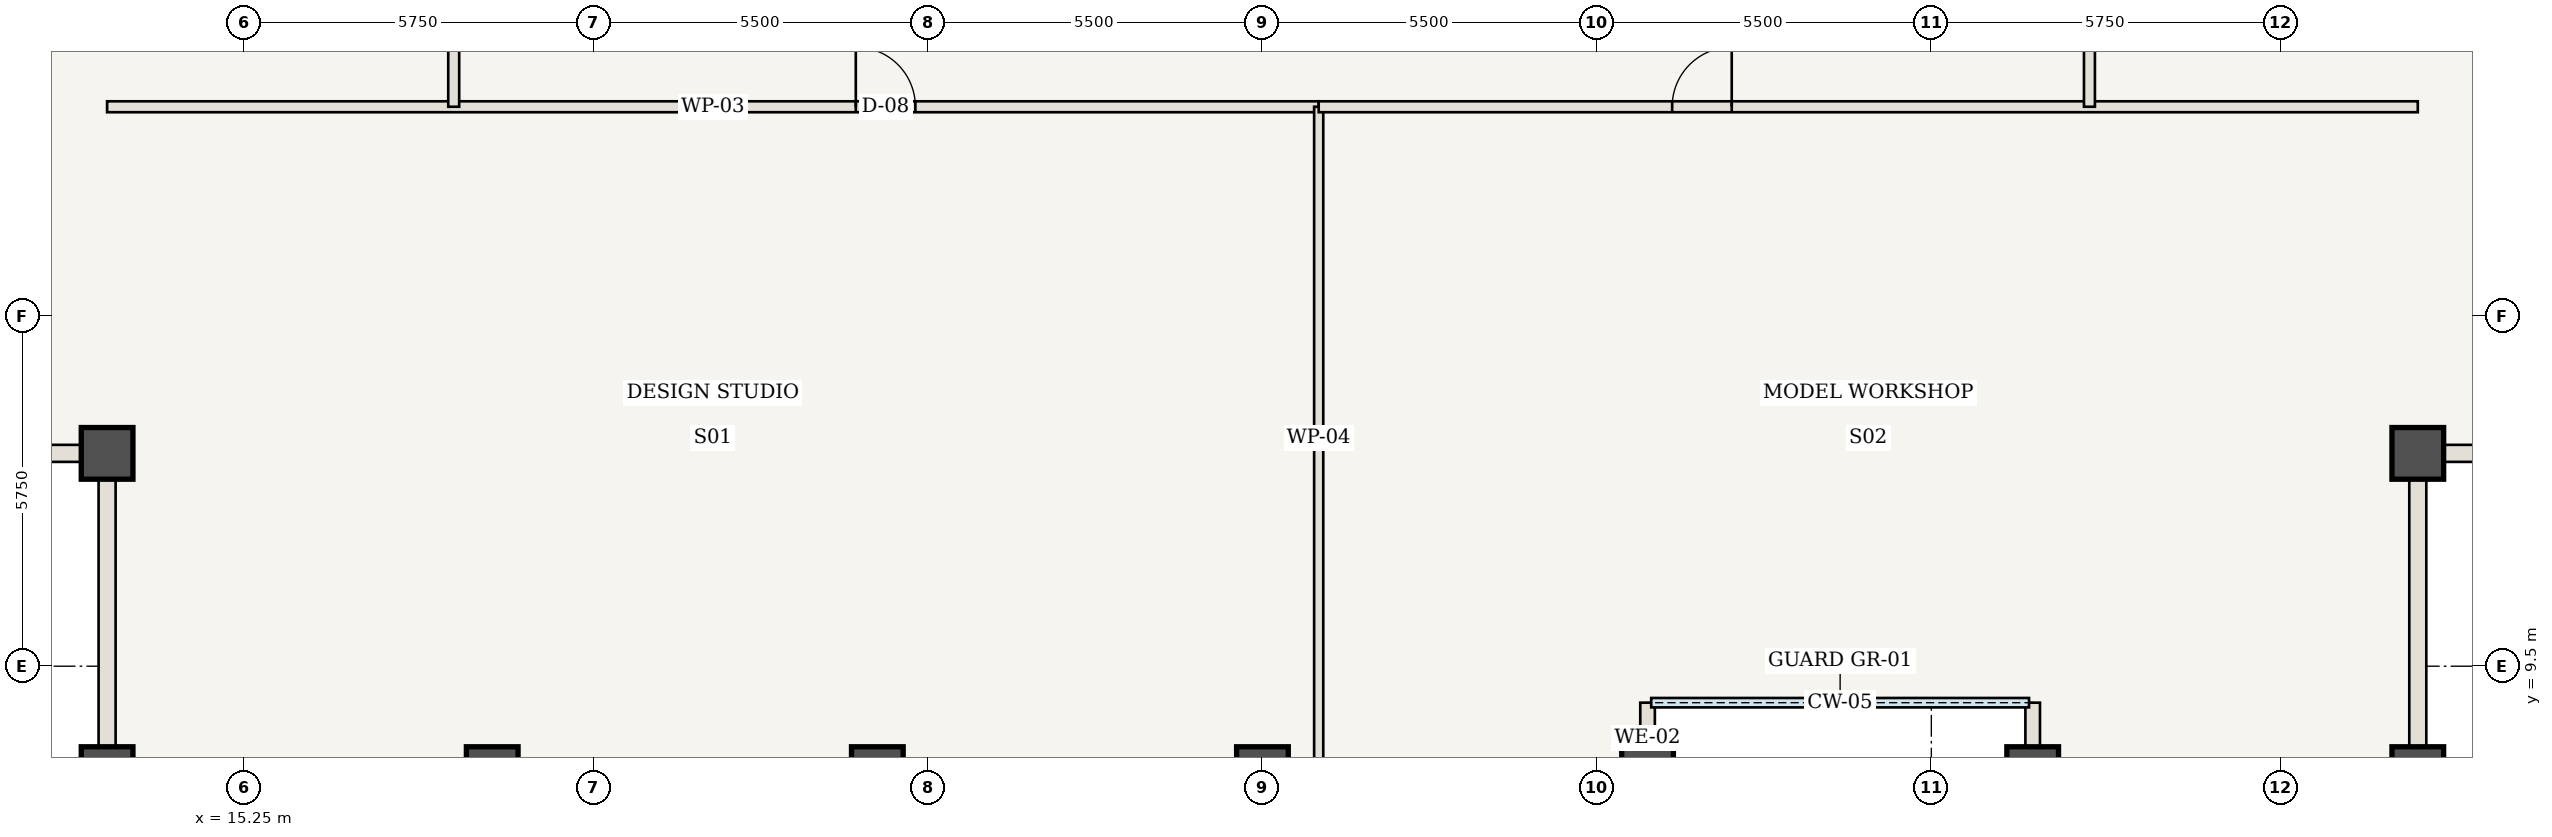
"""IFC4 building model, lengths in metres.
Left out: names, types, materials, properties, quantities, classifications, styles, units other than length and angle.
Written with IfcOpenShell. Run it as: python <this file> out.ifc"""

import sys

from ifc_helpers import new_model, si_unit, direction, frame, frame_2d, origin, origin_2d, place, context, subcontext, project, spatial, rectangle, extrude, element, fill, save


model = new_model("IFC4")
c1 = context("Model", 3, precision=1e-05, world=origin(), true_north=direction((0.0, 1.0)))
c2 = subcontext(c1, "Body", "Model", "MODEL_VIEW")
j1 = project(units=[si_unit("LENGTHUNIT", "METRE"), si_unit("PLANEANGLEUNIT", "RADIAN")], contexts=[c1])
p1 = place(None, origin())
s1 = spatial("IfcSite", under=j1, at=p1, CompositionType="ELEMENT")
p2 = place(p1, origin())
s2 = spatial("IfcBuilding", under=s1, at=p2, CompositionType="ELEMENT")
p3 = place(p2, frame((0.0, 0.0, 213.85)))
s3 = spatial("IfcBuildingStorey", under=s2, at=p3, CompositionType="ELEMENT", Elevation=213.85)
for number, where, z_axis, x_axis in (
    (1, (13.0, 7.75, 0.0), (0.0, 0.0, 1.0), (1.0, 0.0, 0.0)),
    (2, (13.0, 13.0, 0.0), (0.0, 0.0, 1.0), (1.0, 0.0, 0.0)),
    (3, (51.0, 7.75, 0.0), (0.0, 0.0, 1.0), (1.0, 0.0, 0.0)),
    (4, (51.0, 13.0, 0.0), (0.0, 0.0, 1.0), (1.0, 0.0, 0.0)),
    (5, (19.333, 7.75, 0.0), (0.0, 0.0, 1.0), (1.0, 0.0, 0.0)),
    (6, (25.667, 7.75, 0.0), (0.0, 0.0, 1.0), (1.0, 0.0, 0.0)),
    (7, (32.0, 7.75, 0.0), (0.0, 0.0, 1.0), (1.0, 0.0, 0.0)),
    (8, (38.333, 7.75, 0.0), (0.0, 0.0, 1.0), (1.0, 0.0, 0.0)),
    (9, (44.667, 7.75, 0.0), (0.0, 0.0, 1.0), (1.0, 0.0, 0.0)),
):
    element("IfcColumn", number, at=place(p3, frame(where, z_axis=z_axis, x_axis=x_axis)), inside=s3, PredefinedType="COLUMN", context=c2, shape_type="SweptSolid", body=[
        extrude(rectangle(XDim=0.85, YDim=0.85, at=origin_2d()), origin(), (0.0, 0.0, 1.0), 3.85),
    ])
p4 = place(p3, frame((13.0, 18.7, 0.0), z_axis=(0.0, 0.0, 1.0), x_axis=(1.0, 0.0, 0.0)))
e10 = element("IfcWall", 10, at=p4, inside=s3, PredefinedType="STANDARD", context=c2, shape_type="SweptSolid", body=[
    extrude(rectangle(XDim=19.925, YDim=0.18, at=frame_2d((9.962, 0.0))), origin(), (0.0, 0.0, 1.0), 3.685),
])
p5 = place(p4, frame((12.312, 0.0, 0.0)))
e11 = element("IfcOpeningElement", 11, at=p5, cuts=e10, PredefinedType="OPENING", context=c2, shape_type="SweptSolid", body=[
    extrude(rectangle(XDim=0.98, YDim=2.2, at=frame_2d((0.49, 1.1))), frame((0.0, 0.1, 0.0), z_axis=(0.0, -1.0, 0.0), x_axis=(1.0, 0.0, 0.0)), (0.0, 0.0, 1.0), 0.2),
])
p6 = place(p3, frame((32.925, 7.81, 0.0), z_axis=(0.0, 0.0, 1.0), x_axis=(0.0, 1.0, 0.0)))
e12 = element("IfcWall", 12, at=p6, inside=s3, PredefinedType="STANDARD", context=c2, shape_type="SweptSolid", body=[
    extrude(rectangle(XDim=10.89, YDim=0.15, at=frame_2d((5.445, 0.0))), origin(), (0.0, 0.0, 1.0), 3.685),
])
p7 = place(p3, frame((32.925, 18.7, 0.0), z_axis=(0.0, 0.0, 1.0), x_axis=(1.0, 0.0, 0.0)))
e13 = element("IfcWall", 13, at=p7, inside=s3, PredefinedType="STANDARD", context=c2, shape_type="SweptSolid", body=[
    extrude(rectangle(XDim=18.075, YDim=0.18, at=frame_2d((9.038, 0.0))), origin(), (0.0, 0.0, 1.0), 3.685),
])
p8 = place(p7, frame((5.812, 0.0, 0.0)))
e14 = element("IfcOpeningElement", 14, at=p8, cuts=e13, PredefinedType="OPENING", context=c2, shape_type="SweptSolid", body=[
    extrude(rectangle(XDim=0.98, YDim=2.2, at=frame_2d((0.49, 1.1))), frame((0.0, 0.1, 0.0), z_axis=(0.0, -1.0, 0.0), x_axis=(1.0, 0.0, 0.0)), (0.0, 0.0, 1.0), 0.2),
])
p9 = place(p3, frame((18.7, 18.7, 0.0), z_axis=(0.0, 0.0, 1.0), x_axis=(0.0, 1.0, 0.0)))
e15 = element("IfcWall", 15, at=p9, inside=s3, PredefinedType="STANDARD", context=c2, shape_type="SweptSolid", body=[
    extrude(rectangle(XDim=6.192, YDim=0.18, at=frame_2d((3.096, 0.0))), origin(), (0.0, 0.0, 1.0), 3.685),
])
p10 = place(p9, frame((1.146, 0.0, 0.0)))
e16 = element("IfcOpeningElement", 16, at=p10, cuts=e15, PredefinedType="OPENING", context=c2, shape_type="SweptSolid", body=[
    extrude(rectangle(XDim=0.98, YDim=2.2, at=frame_2d((0.49, 1.1))), frame((0.0, 0.1, 0.0), z_axis=(0.0, -1.0, 0.0), x_axis=(1.0, 0.0, 0.0)), (0.0, 0.0, 1.0), 0.2),
])
p11 = place(p3, frame((45.6, 18.7, 0.0), z_axis=(0.0, 0.0, 1.0), x_axis=(0.0, 1.0, 0.0)))
e17 = element("IfcWall", 17, at=p11, inside=s3, PredefinedType="STANDARD", context=c2, shape_type="SweptSolid", body=[
    extrude(rectangle(XDim=14.15, YDim=0.18, at=frame_2d((7.075, 0.0))), origin(), (0.0, 0.0, 1.0), 3.685),
])
p12 = place(p11, frame((6.575, 0.0, 0.0)))
e18 = element("IfcOpeningElement", 18, at=p12, cuts=e17, PredefinedType="OPENING", context=c2, shape_type="SweptSolid", body=[
    extrude(rectangle(XDim=0.98, YDim=2.2, at=frame_2d((0.49, 1.1))), frame((0.0, 0.1, 0.0), z_axis=(0.0, -1.0, 0.0), x_axis=(1.0, 0.0, 0.0)), (0.0, 0.0, 1.0), 0.2),
])
for number, where, z_axis, x_axis in (
    (19, (38.333, 7.75, 0.0), (0.0, 0.0, 1.0), (0.0, 1.0, 0.0)),
    (20, (44.667, 7.75, 0.0), (0.0, 0.0, 1.0), (0.0, 1.0, 0.0)),
):
    element("IfcWall", number, at=place(p3, frame(where, z_axis=z_axis, x_axis=x_axis)), inside=s3, PredefinedType="USERDEFINED", context=c2, shape_type="SweptSolid", body=[
        extrude(rectangle(XDim=1.15, YDim=0.24, at=frame_2d((0.575, 0.0))), origin(), (0.0, 0.0, 1.0), 2.985),
    ])
for number, where, z_axis, x_axis in (
    (21, (13.0, 7.75, 0.0), (0.0, 0.0, 1.0), (0.0, 1.0, 0.0)),
    (22, (13.0, 13.0, 0.0), (0.0, 0.0, 1.0), (-1.0, 0.0, 0.0)),
    (23, (51.0, 13.0, 0.0), (0.0, 0.0, 1.0), (0.0, -1.0, 0.0)),
    (24, (56.25, 13.0, 0.0), (0.0, 0.0, 1.0), (-1.0, 0.0, 0.0)),
):
    element("IfcWall", number, at=place(p3, frame(where, z_axis=z_axis, x_axis=x_axis)), inside=s3, PredefinedType="USERDEFINED", context=c2, shape_type="SweptSolid", body=[
        extrude(rectangle(XDim=5.25, YDim=0.28, at=frame_2d((2.625, 0.0))), origin(), (0.0, 0.0, 1.0), 2.985),
    ])
p13 = place(p5, origin())
e25 = element("IfcDoor", 25, at=p13, inside=s3, OperationType="SINGLE_SWING_LEFT", PredefinedType="DOOR", context=c2, shape_type="SweptSolid", body=[
    extrude(rectangle(XDim=0.98, YDim=2.2, at=frame_2d((0.49, 1.1))), frame((0.0, 0.025, 0.0), z_axis=(0.0, -1.0, 0.0), x_axis=(1.0, 0.0, 0.0)), (0.0, 0.0, 1.0), 0.05),
])
fill(e11, e25)
p14 = place(p8, origin())
e26 = element("IfcDoor", 26, at=p14, inside=s3, OperationType="SINGLE_SWING_RIGHT", PredefinedType="DOOR", context=c2, shape_type="SweptSolid", body=[
    extrude(rectangle(XDim=0.98, YDim=2.2, at=frame_2d((0.49, 1.1))), frame((0.0, 0.025, 0.0), z_axis=(0.0, -1.0, 0.0), x_axis=(1.0, 0.0, 0.0)), (0.0, 0.0, 1.0), 0.05),
])
fill(e14, e26)
save(model, sys.argv[1])
